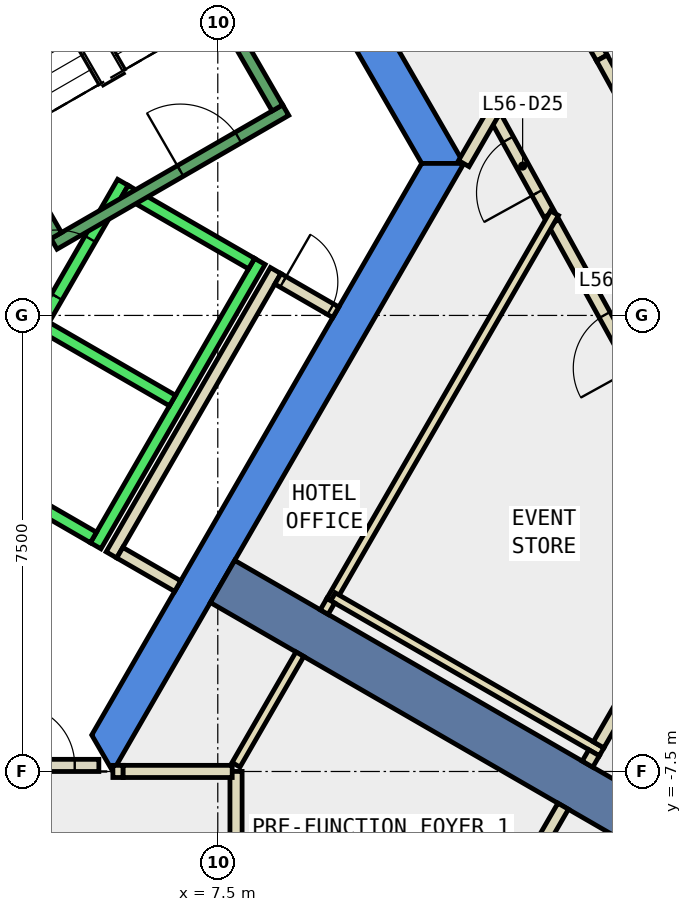
"""IFC4 building model, lengths in metres.
Left out: names, types, materials, properties, quantities, classifications, styles, units other than length and angle.
Written with IfcOpenShell. Run it as: python <this file> out.ifc"""

import sys

from ifc_helpers import new_model, si_unit, direction, frame, frame_2d, origin, place, context, subcontext, project, spatial, polyline, rectangle, outline, extrude, element, fill, save


model = new_model("IFC4")
c1 = context("Model", 3, precision=1e-05, world=origin(), true_north=direction((0.0, 1.0)))
c2 = subcontext(c1, "Body", "Model", "MODEL_VIEW")
j1 = project(units=[si_unit("LENGTHUNIT", "METRE"), si_unit("PLANEANGLEUNIT", "RADIAN")], contexts=[c1])
p1 = place(None, origin())
s1 = spatial("IfcSite", under=j1, at=p1, CompositionType="ELEMENT")
p2 = place(p1, origin())
s2 = spatial("IfcBuilding", under=s1, at=p2, CompositionType="ELEMENT")
p3 = place(p2, frame((0.0, 0.0, 248.6)))
s3 = spatial("IfcBuildingStorey", under=s2, at=p3, CompositionType="ELEMENT", Elevation=248.6)
p4 = place(p3, frame((0.0, 0.0, -0.34)))
e1 = element("IfcWall", 1, at=p4, inside=s3, PredefinedType="SHEAR", context=c2, shape_type="SweptSolid", body=[
    extrude(outline(polyline([(6.786, 10.747), (6.266, 10.447), (10.854, 2.5), (11.547, 2.5), (6.786, 10.747)])), origin(), (0.0, 0.0, 1.0), 3.6),
])
p5 = place(p3, frame((0.0, 0.0, -0.34)))
e2 = element("IfcWall", 2, at=p5, inside=s3, PredefinedType="SHEAR", context=c2, shape_type="SweptSolid", body=[
    extrude(outline(polyline([(5.774, -7.5), (11.547, 2.5), (10.854, 2.5), (5.427, -6.9), (5.774, -7.5)])), origin(), (0.0, 0.0, 1.0), 3.6),
])
p6 = place(p3, frame((7.578, -4.375, -0.34), z_axis=(0.0, 0.0, 1.0), x_axis=(0.866024315419, -0.5000018851, 0.0)))
e3 = element("IfcWall", 3, at=p6, inside=s3, PredefinedType="SHEAR", context=c2, shape_type="SweptSolid", body=[
    extrude(rectangle(XDim=9.0, YDim=0.8, at=frame_2d((4.5, 0.0))), origin(), (0.0, 0.0, 1.0), 3.6),
])
p7 = place(p3, frame((12.952, 1.661, 0.0), z_axis=(0.0, 0.0, 1.0), x_axis=(-0.482707835392, 0.875781448566, 0.0)))
e4 = element("IfcWall", 4, at=p7, inside=s3, PredefinedType="PARTITIONING", context=c2, shape_type="SweptSolid", body=[
    extrude(rectangle(XDim=1.817, YDim=0.2, at=frame_2d((0.908, 0.0))), origin(), (0.0, 0.0, 1.0), 3.26),
])
p8 = place(p7, frame((0.408, 0.0, 0.0)))
e5 = element("IfcOpeningElement", 5, at=p8, cuts=e4, PredefinedType="OPENING", context=c2, shape_type="SweptSolid", body=[
    extrude(rectangle(XDim=1.0, YDim=2.1, at=frame_2d((0.5, 1.05))), frame((0.0, 0.11, 0.0), z_axis=(0.0, -1.0, 0.0), x_axis=(1.0, 0.0, 0.0)), (0.0, 0.0, 1.0), 0.22),
])
p9 = place(p3, frame((12.079, 3.419, 0.0), z_axis=(0.0, 0.0, 1.0), x_axis=(-0.500674759037, -0.865635480825, 0.0)))
e6 = element("IfcWall", 6, at=p9, inside=s3, PredefinedType="PARTITIONING", context=c2, shape_type="SweptSolid", body=[
    extrude(rectangle(XDim=1.065, YDim=0.2, at=frame_2d((0.532, 0.0))), origin(), (0.0, 0.0, 1.0), 3.26),
])
p10 = place(p3, frame((15.186, -2.391, 0.0), z_axis=(0.0, 0.0, 1.0), x_axis=(-0.482858240592, 0.875698532311, 0.0)))
e7 = element("IfcWall", 7, at=p10, inside=s3, PredefinedType="PARTITIONING", context=c2, shape_type="SweptSolid", body=[
    extrude(rectangle(XDim=4.478, YDim=0.2, at=frame_2d((2.239, 0.0))), origin(), (0.0, 0.0, 1.0), 3.26),
])
p11 = place(p10, frame((1.739, 0.0, 0.0)))
e8 = element("IfcOpeningElement", 8, at=p11, cuts=e7, PredefinedType="OPENING", context=c2, shape_type="SweptSolid", body=[
    extrude(rectangle(XDim=1.0, YDim=2.1, at=frame_2d((0.5, 1.05))), frame((0.0, 0.11, 0.0), z_axis=(0.0, -1.0, 0.0), x_axis=(1.0, 0.0, 0.0)), (0.0, 0.0, 1.0), 0.22),
])
p12 = place(p3, frame((12.234, 6.977, 0.0), z_axis=(0.0, 0.0, 1.0), x_axis=(0.499820325382, -0.866129114125, 0.0)))
e9 = element("IfcWall", 9, at=p12, inside=s3, PredefinedType="PARTITIONING", context=c2, shape_type="SweptSolid", body=[
    extrude(rectangle(XDim=3.167, YDim=0.2, at=frame_2d((1.583, 0.0))), origin(), (0.0, 0.0, 1.0), 3.26),
])
p13 = place(p12, frame((1.084, 0.0, 0.0)))
e10 = element("IfcOpeningElement", 10, at=p13, cuts=e9, PredefinedType="OPENING", context=c2, shape_type="SweptSolid", body=[
    extrude(rectangle(XDim=1.0, YDim=2.1, at=frame_2d((0.5, 1.05))), frame((0.0, 0.11, 0.0), z_axis=(0.0, -1.0, 0.0), x_axis=(1.0, 0.0, 0.0)), (0.0, 0.0, 1.0), 0.22),
])
p14 = place(p3, frame((13.817, 4.234, 0.0), z_axis=(0.0, 0.0, 1.0), x_axis=(0.482871474341, -0.875691235121, 0.0)))
e11 = element("IfcWall", 11, at=p14, inside=s3, PredefinedType="PARTITIONING", context=c2, shape_type="SweptSolid", body=[
    extrude(rectangle(XDim=3.167, YDim=0.2, at=frame_2d((1.583, 0.0))), origin(), (0.0, 0.0, 1.0), 3.26),
])
p15 = place(p3, frame((5.751, -3.938, 0.0), z_axis=(0.0, 0.0, 1.0), x_axis=(0.500034260056, 0.866005622828, 0.0)))
e12 = element("IfcWall", 12, at=p15, inside=s3, PredefinedType="PARTITIONING", context=c2, shape_type="SweptSolid", body=[
    extrude(rectangle(XDim=5.399, YDim=0.2, at=frame_2d((2.7, 0.0))), origin(), (0.0, 0.0, 1.0), 3.26),
])
p16 = place(p3, frame((8.488, 0.602, 0.0), z_axis=(0.0, 0.0, 1.0), x_axis=(0.866063652425, -0.499933745558, 0.0)))
e13 = element("IfcWall", 13, at=p16, inside=s3, PredefinedType="PARTITIONING", context=c2, shape_type="SweptSolid", body=[
    extrude(rectangle(XDim=1.1, YDim=0.2, at=frame_2d((0.55, 0.0))), origin(), (0.0, 0.0, 1.0), 3.26),
])
p17 = place(p16, frame((0.1, 0.0, 0.0)))
e14 = element("IfcOpeningElement", 14, at=p17, cuts=e13, PredefinedType="OPENING", context=c2, shape_type="SweptSolid", body=[
    extrude(rectangle(XDim=0.9, YDim=2.1, at=frame_2d((0.45, 1.05))), frame((0.0, 0.11, 0.0), z_axis=(0.0, -1.0, 0.0), x_axis=(1.0, 0.0, 0.0)), (0.0, 0.0, 1.0), 0.22),
])
p18 = place(p3, frame((6.841, -4.452, 0.0), z_axis=(0.0, 0.0, 1.0), x_axis=(-0.86621513555, 0.499671230855, 0.0)))
e15 = element("IfcWall", 15, at=p18, inside=s3, PredefinedType="PARTITIONING", context=c2, shape_type="SweptSolid", body=[
    extrude(rectangle(XDim=1.1, YDim=0.2, at=frame_2d((0.55, 0.0))), origin(), (0.0, 0.0, 1.0), 3.26),
])
p19 = place(p3, frame((5.775, -7.499, 0.0), z_axis=(0.0, 0.0, 1.0), x_axis=(1.0, 0.0, 0.0)))
e16 = element("IfcWall", 16, at=p19, inside=s3, PredefinedType="PARTITIONING", context=c2, shape_type="SweptSolid", body=[
    extrude(rectangle(XDim=0.169, YDim=0.2, at=frame_2d((0.084, 0.0))), origin(), (0.0, 0.0, 1.0), 2.4),
])
p20 = place(p3, frame((7.8, -7.39, 0.0), z_axis=(0.0, 0.0, 1.0), x_axis=(0.499977374825, 0.866038466041, 0.0)))
e17 = element("IfcWall", 17, at=p20, inside=s3, PredefinedType="PARTITIONING", context=c2, shape_type="SweptSolid", body=[
    extrude(rectangle(XDim=2.1, YDim=0.15, at=frame_2d((1.05, 0.0))), origin(), (0.0, 0.0, 1.0), 3.26),
])
p21 = place(p3, frame((9.358, -4.692, 0.0), z_axis=(0.0, 0.0, 1.0), x_axis=(0.500027777314, 0.866009365951, 0.0)))
e18 = element("IfcWall", 18, at=p21, inside=s3, PredefinedType="PARTITIONING", context=c2, shape_type="SweptSolid", body=[
    extrude(rectangle(XDim=7.36, YDim=0.15, at=frame_2d((3.68, 0.0))), origin(), (0.0, 0.0, 1.0), 3.26),
])
p22 = place(p3, frame((7.8, -7.499, 0.0), z_axis=(0.0, 0.0, 1.0), x_axis=(0.0, -1.0, 0.0)))
e19 = element("IfcWall", 19, at=p22, inside=s3, PredefinedType="PARTITIONING", context=c2, shape_type="SweptSolid", body=[
    extrude(rectangle(XDim=4.604, YDim=0.2, at=frame_2d((2.302, 0.0))), origin(), (0.0, 0.0, 1.0), 3.26),
])
p23 = place(p22, frame((1.802, 0.0, 0.0)))
e20 = element("IfcOpeningElement", 20, at=p23, cuts=e19, PredefinedType="OPENING", context=c2, shape_type="SweptSolid", body=[
    extrude(rectangle(XDim=1.0, YDim=2.1, at=frame_2d((0.5, 1.05))), frame((0.0, 0.11, 0.0), z_axis=(0.0, -1.0, 0.0), x_axis=(1.0, 0.0, 0.0)), (0.0, 0.0, 1.0), 0.22),
])
p24 = place(p3, frame((9.395, -4.627, 0.0), z_axis=(0.0, 0.0, 1.0), x_axis=(0.866034131428, -0.499984882974, 0.0)))
e21 = element("IfcWall", 21, at=p24, inside=s3, PredefinedType="PARTITIONING", context=c2, shape_type="SweptSolid", body=[
    extrude(rectangle(XDim=5.1, YDim=0.15, at=frame_2d((2.55, 0.0))), origin(), (0.0, 0.0, 1.0), 3.26),
])
p25 = place(p3, frame((13.18, -8.071, 0.0), z_axis=(0.0, 0.0, 1.0), x_axis=(-0.499914724673, -0.86607463192, 0.0)))
e22 = element("IfcWall", 22, at=p25, inside=s3, PredefinedType="PARTITIONING", context=c2, shape_type="SweptSolid", body=[
    extrude(rectangle(XDim=4.507, YDim=0.2, at=frame_2d((2.253, 0.0))), origin(), (0.0, 0.0, 1.0), 3.26),
])
p26 = place(p3, frame((13.688, -7.192, 0.0), z_axis=(0.0, 0.0, 1.0), x_axis=(-0.499787711288, -0.866147934042, 0.0)))
e23 = element("IfcWall", 23, at=p26, inside=s3, PredefinedType="PARTITIONING", context=c2, shape_type="SweptSolid", body=[
    extrude(rectangle(XDim=0.216, YDim=0.2, at=frame_2d((0.108, 0.0))), origin(), (0.0, 0.0, 1.0), 3.26),
])
p27 = place(p3, frame((15.793, -3.546, 0.0), z_axis=(0.0, 0.0, 1.0), x_axis=(-0.500000064182, -0.866025366729, 0.0)))
e24 = element("IfcWall", 24, at=p27, inside=s3, PredefinedType="PARTITIONING", context=c2, shape_type="SweptSolid", body=[
    extrude(rectangle(XDim=4.06, YDim=0.2, at=frame_2d((2.03, 0.0))), origin(), (0.0, 0.0, 1.0), 3.26),
])
p28 = place(p3, frame((3.75, -7.4, 0.0), z_axis=(0.0, 0.0, 1.0), x_axis=(1.0, 0.0, 0.0)))
e25 = element("IfcWall", 25, at=p28, inside=s3, PredefinedType="PARTITIONING", context=c2, shape_type="SweptSolid", body=[
    extrude(rectangle(XDim=1.794, YDim=0.2, at=frame_2d((0.897, 0.0))), origin(), (0.0, 0.0, 1.0), 2.4),
])
p29 = place(p28, frame((0.397, 0.0, 0.0)))
e26 = element("IfcOpeningElement", 26, at=p29, cuts=e25, PredefinedType="OPENING", context=c2, shape_type="SweptSolid", body=[
    extrude(rectangle(XDim=1.0, YDim=2.1, at=frame_2d((0.5, 1.05))), frame((0.0, 0.11, 0.0), z_axis=(0.0, -1.0, 0.0), x_axis=(1.0, 0.0, 0.0)), (0.0, 0.0, 1.0), 0.22),
])
p30 = place(p3, frame((9.25, -4.879, 0.0), z_axis=(0.0, 0.0, 1.0), x_axis=(0.499787711288, 0.866147934042, 0.0)))
e27 = element("IfcWall", 27, at=p30, inside=s3, PredefinedType="PARTITIONING", context=c2, shape_type="SweptSolid", body=[
    extrude(rectangle(XDim=0.216, YDim=0.15, at=frame_2d((0.108, 0.0))), origin(), (0.0, 0.0, 1.0), 3.26),
])
p31 = place(p3, frame((5.944, -7.499, 0.0), z_axis=(0.0, 0.0, 1.0), x_axis=(1.0, 0.0, 0.0)))
e28 = element("IfcWall", 28, at=p31, inside=s3, PredefinedType="PARTITIONING", context=c2, shape_type="SweptSolid", body=[
    extrude(rectangle(XDim=1.793, YDim=0.2, at=frame_2d((0.896, 0.0))), origin(), (0.0, 0.0, 1.0), 3.26),
])
p32 = place(p3, frame((3.24, -2.488, 0.0), z_axis=(0.0, 0.0, 1.0), x_axis=(0.500034260056, 0.866005622828, 0.0)))
e29 = element("IfcWall", 29, at=p32, inside=s3, PredefinedType="STANDARD", context=c2, shape_type="SweptSolid", body=[
    extrude(rectangle(XDim=5.399, YDim=0.2, at=frame_2d((2.7, 0.0))), origin(), (0.0, 0.0, 1.0), 3.26),
])
p33 = place(p32, frame((3.225, 0.0, 0.0)))
e30 = element("IfcOpeningElement", 30, at=p33, cuts=e29, PredefinedType="OPENING", context=c2, shape_type="SweptSolid", body=[
    extrude(rectangle(XDim=1.1, YDim=2.1, at=frame_2d((0.55, 1.05))), frame((0.0, 0.11, 0.0), z_axis=(0.0, -1.0, 0.0), x_axis=(1.0, 0.0, 0.0)), (0.0, 0.0, 1.0), 0.22),
])
p34 = place(p32, frame((1.225, 0.0, 0.0)))
e31 = element("IfcOpeningElement", 31, at=p34, cuts=e29, PredefinedType="OPENING", context=c2, shape_type="SweptSolid", body=[
    extrude(rectangle(XDim=1.1, YDim=2.1, at=frame_2d((0.55, 1.05))), frame((0.0, 0.11, 0.0), z_axis=(0.0, -1.0, 0.0), x_axis=(1.0, 0.0, 0.0)), (0.0, 0.0, 1.0), 0.22),
])
p35 = place(p3, frame((5.492, -3.788, 0.0), z_axis=(0.0, 0.0, 1.0), x_axis=(0.500034260056, 0.866005622828, 0.0)))
e32 = element("IfcWall", 32, at=p35, inside=s3, PredefinedType="STANDARD", context=c2, shape_type="SweptSolid", body=[
    extrude(rectangle(XDim=5.399, YDim=0.2, at=frame_2d((2.7, 0.0))), origin(), (0.0, 0.0, 1.0), 3.26),
])
p36 = place(p3, frame((3.377, -2.452, 0.0), z_axis=(0.0, 0.0, 1.0), x_axis=(0.865955154139, -0.50012165622, 0.0)))
e33 = element("IfcWall", 33, at=p36, inside=s3, PredefinedType="STANDARD", context=c2, shape_type="SweptSolid", body=[
    extrude(rectangle(XDim=2.4, YDim=0.2, at=frame_2d((1.2, 0.0))), origin(), (0.0, 0.0, 1.0), 3.26),
])
for number, where, z_axis, x_axis in (
    (34, (4.677, -0.2, 0.0), (0.0, 0.0, 1.0), (0.866, -0.5, 0.0)),
    (35, (5.977, 2.052, 0.0), (0.0, 0.0, 1.0), (0.866, -0.5, 0.0)),
):
    element("IfcWall", number, at=place(p3, frame(where, z_axis=z_axis, x_axis=x_axis)), inside=s3, PredefinedType="STANDARD", context=c2, shape_type="SweptSolid", body=[
        extrude(rectangle(XDim=2.399, YDim=0.2, at=frame_2d((1.2, 0.0))), origin(), (0.0, 0.0, 1.0), 3.26),
    ])
p37 = place(p3, frame((4.806, 1.176, 0.0), z_axis=(0.0, 0.0, 1.0), x_axis=(0.866059941101, 0.499940174841, 0.0)))
e36 = element("IfcWall", 36, at=p37, inside=s3, PredefinedType="STANDARD", context=c2, shape_type="SweptSolid", body=[
    extrude(rectangle(XDim=4.4, YDim=0.2, at=frame_2d((2.2, 0.0))), origin(), (0.0, 0.0, 1.0), 3.26),
])
p38 = place(p37, frame((2.4, 0.0, 0.0)))
e37 = element("IfcOpeningElement", 37, at=p38, cuts=e36, PredefinedType="OPENING", context=c2, shape_type="SweptSolid", body=[
    extrude(rectangle(XDim=1.1, YDim=2.2, at=frame_2d((0.55, 1.1))), frame((0.0, 0.11, 0.0), z_axis=(0.0, -1.0, 0.0), x_axis=(1.0, 0.0, 0.0)), (0.0, 0.0, 1.0), 0.22),
])
p39 = place(p3, frame((4.843, 1.312, 0.0), z_axis=(0.0, 0.0, 1.0), x_axis=(-0.499963383562, 0.866046543262, 0.0)))
e38 = element("IfcWall", 38, at=p39, inside=s3, PredefinedType="STANDARD", context=c2, shape_type="SweptSolid", body=[
    extrude(rectangle(XDim=6.9, YDim=0.2, at=frame_2d((3.45, 0.0))), origin(), (0.0, 0.0, 1.0), 3.26),
])
p40 = place(p39, frame((0.45, 0.0, 0.0)))
e39 = element("IfcOpeningElement", 39, at=p40, cuts=e38, PredefinedType="OPENING", context=c2, shape_type="SweptSolid", body=[
    extrude(rectangle(XDim=1.1, YDim=2.2, at=frame_2d((0.55, 1.1))), frame((0.0, 0.11, 0.0), z_axis=(0.0, -1.0, 0.0), x_axis=(1.0, 0.0, 0.0)), (0.0, 0.0, 1.0), 0.22),
])
p41 = place(p3, frame((8.48, 3.412, 0.0), z_axis=(0.0, 0.0, 1.0), x_axis=(-0.499978703459, 0.866037698999, 0.0)))
e40 = element("IfcWall", 40, at=p41, inside=s3, PredefinedType="STANDARD", context=c2, shape_type="SweptSolid", body=[
    extrude(rectangle(XDim=6.9, YDim=0.2, at=frame_2d((3.45, 0.0))), origin(), (0.0, 0.0, 1.0), 3.26),
])
p42 = place(p11, origin())
e41 = element("IfcDoor", 41, at=p42, inside=s3, OperationType="SINGLE_SWING_LEFT", PredefinedType="DOOR", context=c2, shape_type="SweptSolid", body=[
    extrude(rectangle(XDim=1.0, YDim=2.1, at=frame_2d((0.5, 1.05))), frame((0.0, 0.025, 0.0), z_axis=(0.0, -1.0, 0.0), x_axis=(1.0, 0.0, 0.0)), (0.0, 0.0, 1.0), 0.05),
])
fill(e8, e41)
p43 = place(p8, origin())
e42 = element("IfcDoor", 42, at=p43, inside=s3, OperationType="SINGLE_SWING_RIGHT", PredefinedType="DOOR", context=c2, shape_type="SweptSolid", body=[
    extrude(rectangle(XDim=1.0, YDim=2.1, at=frame_2d((0.5, 1.05))), frame((0.0, 0.025, 0.0), z_axis=(0.0, -1.0, 0.0), x_axis=(1.0, 0.0, 0.0)), (0.0, 0.0, 1.0), 0.05),
])
fill(e5, e42)
p44 = place(p17, origin())
e43 = element("IfcDoor", 43, at=p44, inside=s3, OperationType="SINGLE_SWING_RIGHT", PredefinedType="DOOR", context=c2, shape_type="SweptSolid", body=[
    extrude(rectangle(XDim=0.9, YDim=2.1, at=frame_2d((0.45, 1.05))), frame((0.0, 0.025, 0.0), z_axis=(0.0, -1.0, 0.0), x_axis=(1.0, 0.0, 0.0)), (0.0, 0.0, 1.0), 0.05),
])
fill(e14, e43)
p45 = place(p29, origin())
e44 = element("IfcDoor", 44, at=p45, inside=s3, OperationType="SINGLE_SWING_LEFT", PredefinedType="DOOR", context=c2, shape_type="SweptSolid", body=[
    extrude(rectangle(XDim=1.0, YDim=2.1, at=frame_2d((0.5, 1.05))), frame((0.0, 0.025, 0.0), z_axis=(0.0, -1.0, 0.0), x_axis=(1.0, 0.0, 0.0)), (0.0, 0.0, 1.0), 0.05),
])
fill(e26, e44)
p46 = place(p33, origin())
e45 = element("IfcDoor", 45, at=p46, inside=s3, OperationType="SLIDING_TO_LEFT", PredefinedType="DOOR", context=c2, shape_type="SweptSolid", body=[
    extrude(rectangle(XDim=1.1, YDim=2.1, at=frame_2d((0.55, 1.05))), frame((0.0, 0.025, 0.0), z_axis=(0.0, -1.0, 0.0), x_axis=(1.0, 0.0, 0.0)), (0.0, 0.0, 1.0), 0.05),
])
fill(e30, e45)
p47 = place(p38, origin())
e46 = element("IfcDoor", 46, at=p47, inside=s3, OperationType="SINGLE_SWING_LEFT", PredefinedType="DOOR", context=c2, shape_type="SweptSolid", body=[
    extrude(rectangle(XDim=1.1, YDim=2.2, at=frame_2d((0.55, 1.1))), frame((0.0, 0.025, 0.0), z_axis=(0.0, -1.0, 0.0), x_axis=(1.0, 0.0, 0.0)), (0.0, 0.0, 1.0), 0.05),
])
fill(e37, e46)
save(model, sys.argv[1])
